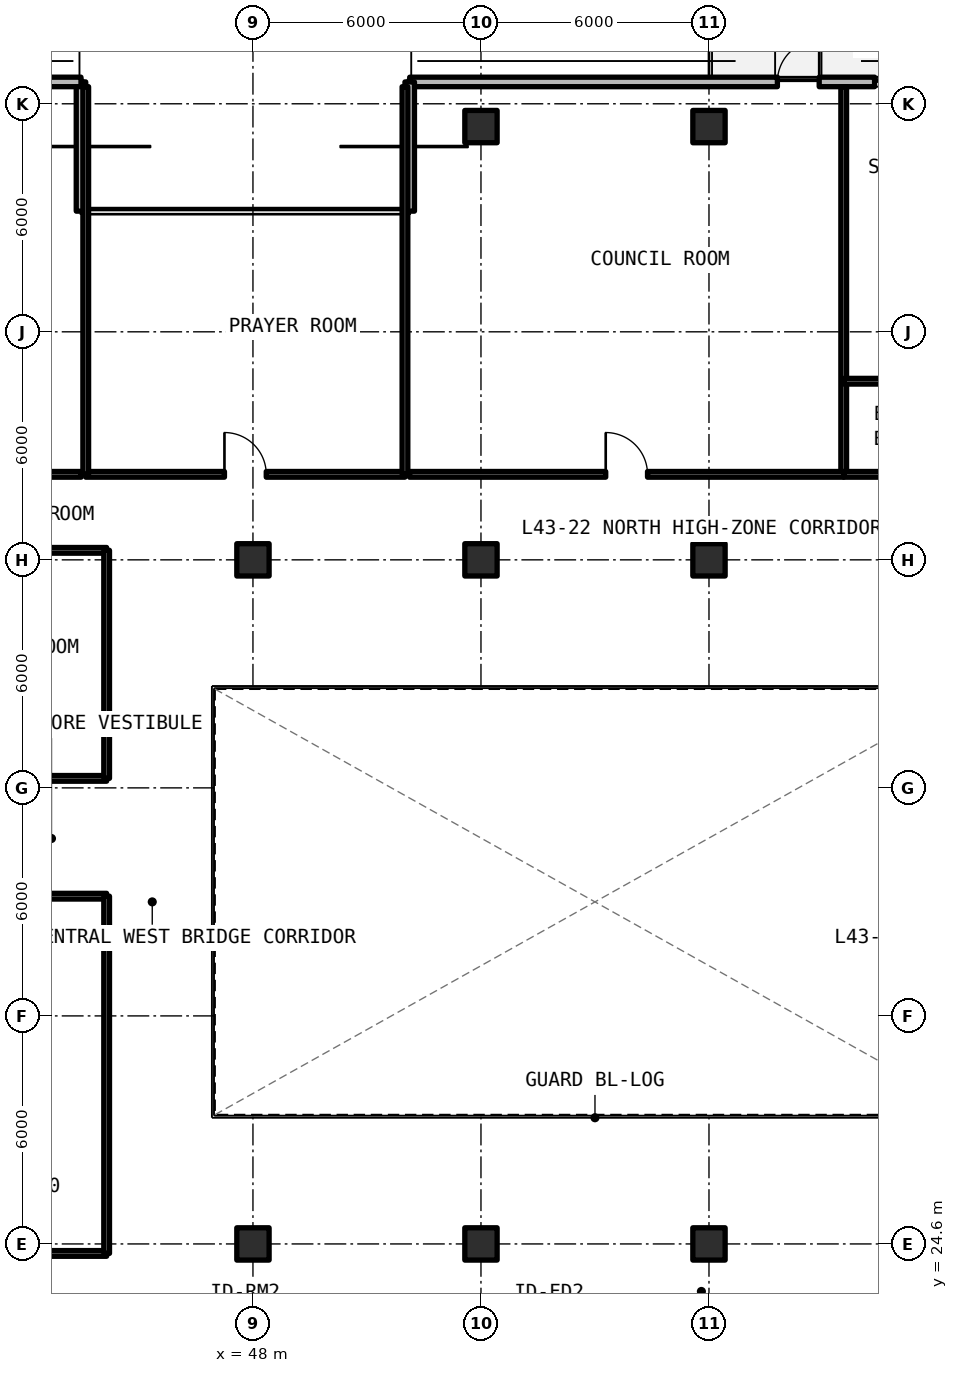
"""IFC4 building model, lengths in metres.
Left out: names, types, materials, properties, quantities, classifications, styles, units other than length and angle.
Written with IfcOpenShell. Run it as: python <this file> out.ifc"""

import sys

from ifc_helpers import new_model, si_unit, direction, frame, frame_2d, origin, origin_2d, place, context, subcontext, project, spatial, rectangle, extrude, element, fill, save


model = new_model("IFC4")
c1 = context("Model", 3, precision=1e-05, world=origin(), true_north=direction((0.0, 1.0)))
c2 = subcontext(c1, "Body", "Model", "MODEL_VIEW")
j1 = project(units=[si_unit("LENGTHUNIT", "METRE"), si_unit("PLANEANGLEUNIT", "RADIAN")], contexts=[c1])
p1 = place(None, origin())
s1 = spatial("IfcSite", under=j1, at=p1, CompositionType="ELEMENT")
p2 = place(p1, origin())
s2 = spatial("IfcBuilding", under=s1, at=p2, CompositionType="ELEMENT")
p3 = place(p2, frame((0.0, 0.0, 155.1)))
s3 = spatial("IfcBuildingStorey", under=s2, at=p3, CompositionType="ELEMENT", Elevation=155.1)
for number, where, z_axis, x_axis in (
    (1, (48.0, 24.6, 0.0), (0.0, 0.0, 1.0), (1.0, 0.0, 0.0)),
    (2, (48.0, 42.6, 0.0), (0.0, 0.0, 1.0), (1.0, 0.0, 0.0)),
    (3, (54.0, 24.6, 0.0), (0.0, 0.0, 1.0), (1.0, 0.0, 0.0)),
    (4, (54.0, 42.6, 0.0), (0.0, 0.0, 1.0), (1.0, 0.0, 0.0)),
    (5, (60.0, 24.6, 0.0), (0.0, 0.0, 1.0), (1.0, 0.0, 0.0)),
    (6, (60.0, 42.6, 0.0), (0.0, 0.0, 1.0), (1.0, 0.0, 0.0)),
    (7, (54.0, 54.0, 0.0), (0.0, 0.0, 1.0), (1.0, 0.0, 0.0)),
    (8, (60.0, 54.0, 0.0), (0.0, 0.0, 1.0), (1.0, 0.0, 0.0)),
):
    element("IfcColumn", number, at=place(p3, frame(where, z_axis=z_axis, x_axis=x_axis)), inside=s3, PredefinedType="COLUMN", context=c2, shape_type="SweptSolid", body=[
        extrude(rectangle(XDim=0.85, YDim=0.85, at=origin_2d()), origin(), (0.0, 0.0, 1.0), 3.3),
    ])
p4 = place(p3, frame((95.748, 55.175, 0.0), z_axis=(0.0, 0.0, 1.0), x_axis=(-1.0, 0.0, 0.0)))
e9 = element("IfcWall", 9, at=p4, inside=s3, PredefinedType="SOLIDWALL", context=c2, shape_type="SweptSolid", body=[
    extrude(rectangle(XDim=43.623, YDim=0.25, at=frame_2d((21.812, 0.0))), origin(), (0.0, 0.0, 1.0), 3.08),
])
p5 = place(p4, frame((32.848, 0.0, 0.0)))
e10 = element("IfcOpeningElement", 10, at=p5, cuts=e9, PredefinedType="OPENING", context=c2, shape_type="SweptSolid", body=[
    extrude(rectangle(XDim=1.1, YDim=2.15, at=frame_2d((0.55, 1.075))), frame((0.0, 0.135, 0.0), z_axis=(0.0, -1.0, 0.0), x_axis=(1.0, 0.0, 0.0)), (0.0, 0.0, 1.0), 0.27),
])
p6 = place(p4, frame((19.498, 0.0, 0.0)))
e11 = element("IfcOpeningElement", 11, at=p6, cuts=e9, PredefinedType="OPENING", context=c2, shape_type="SweptSolid", body=[
    extrude(rectangle(XDim=1.1, YDim=2.15, at=frame_2d((0.55, 1.075))), frame((0.0, 0.135, 0.0), z_axis=(0.0, -1.0, 0.0), x_axis=(1.0, 0.0, 0.0)), (0.0, 0.0, 1.0), 0.27),
])
p7 = place(p4, frame((30.541, 0.0, 0.78)))
e12 = element("IfcOpeningElement", 12, at=p7, cuts=e9, PredefinedType="OPENING", context=c2, shape_type="SweptSolid", body=[
    extrude(rectangle(XDim=0.85, YDim=1.65, at=frame_2d((0.425, 0.825))), frame((0.0, 0.135, 0.0), z_axis=(0.0, -1.0, 0.0), x_axis=(1.0, 0.0, 0.0)), (0.0, 0.0, 1.0), 0.27),
])
p8 = place(p4, frame((24.524, 0.0, 0.78)))
e13 = element("IfcOpeningElement", 13, at=p8, cuts=e9, PredefinedType="OPENING", context=c2, shape_type="SweptSolid", body=[
    extrude(rectangle(XDim=1.8, YDim=1.66, at=frame_2d((0.9, 0.83))), frame((0.0, 0.135, 0.0), z_axis=(0.0, -1.0, 0.0), x_axis=(1.0, 0.0, 0.0)), (0.0, 0.0, 1.0), 0.27),
])
p9 = place(p4, frame((9.092, 0.0, 0.78)))
e14 = element("IfcOpeningElement", 14, at=p9, cuts=e9, PredefinedType="OPENING", context=c2, shape_type="SweptSolid", body=[
    extrude(rectangle(XDim=1.8, YDim=1.66, at=frame_2d((0.9, 0.83))), frame((0.0, 0.135, 0.0), z_axis=(0.0, -1.0, 0.0), x_axis=(1.0, 0.0, 0.0)), (0.0, 0.0, 1.0), 0.27),
])
p10 = place(p4, frame((2.61, 0.0, 0.78)))
e15 = element("IfcOpeningElement", 15, at=p10, cuts=e9, PredefinedType="OPENING", context=c2, shape_type="SweptSolid", body=[
    extrude(rectangle(XDim=1.8, YDim=1.66, at=frame_2d((0.9, 0.83))), frame((0.0, 0.135, 0.0), z_axis=(0.0, -1.0, 0.0), x_axis=(1.0, 0.0, 0.0)), (0.0, 0.0, 1.0), 0.27),
])
for number, where, z_axis, x_axis in (
    (16, (52.125, 55.175, 0.0), (0.0, 0.0, 1.0), (0.0, -1.0, 0.0)),
    (17, (43.475, 51.775, 0.0), (0.0, 0.0, 1.0), (0.0, 1.0, 0.0)),
):
    element("IfcWall", number, at=place(p3, frame(where, z_axis=z_axis, x_axis=x_axis)), inside=s3, PredefinedType="SOLIDWALL", context=c2, shape_type="SweptSolid", body=[
        extrude(rectangle(XDim=3.4, YDim=0.25, at=frame_2d((1.7, 0.0))), origin(), (0.0, 0.0, 1.0), 3.08),
    ])
p11 = place(p3, frame((43.475, 55.175, 0.0), z_axis=(0.0, 0.0, 1.0), x_axis=(-1.0, 0.0, 0.0)))
e18 = element("IfcWall", 18, at=p11, inside=s3, PredefinedType="SOLIDWALL", context=c2, shape_type="SweptSolid", body=[
    extrude(rectangle(XDim=19.623, YDim=0.25, at=frame_2d((9.812, 0.0))), origin(), (0.0, 0.0, 1.0), 3.08),
])
p12 = place(p11, frame((15.625, 0.0, 0.0)))
e19 = element("IfcOpeningElement", 19, at=p12, cuts=e18, PredefinedType="OPENING", context=c2, shape_type="SweptSolid", body=[
    extrude(rectangle(XDim=1.1, YDim=2.15, at=frame_2d((0.55, 1.075))), frame((0.0, 0.135, 0.0), z_axis=(0.0, -1.0, 0.0), x_axis=(1.0, 0.0, 0.0)), (0.0, 0.0, 1.0), 0.27),
])
p13 = place(p11, frame((11.76, 0.0, 0.78)))
e20 = element("IfcOpeningElement", 20, at=p13, cuts=e18, PredefinedType="OPENING", context=c2, shape_type="SweptSolid", body=[
    extrude(rectangle(XDim=0.85, YDim=1.65, at=frame_2d((0.425, 0.825))), frame((0.0, 0.135, 0.0), z_axis=(0.0, -1.0, 0.0), x_axis=(1.0, 0.0, 0.0)), (0.0, 0.0, 1.0), 0.27),
])
p14 = place(p11, frame((9.829, 0.0, 0.78)))
e21 = element("IfcOpeningElement", 21, at=p14, cuts=e18, PredefinedType="OPENING", context=c2, shape_type="SweptSolid", body=[
    extrude(rectangle(XDim=0.85, YDim=1.65, at=frame_2d((0.425, 0.825))), frame((0.0, 0.135, 0.0), z_axis=(0.0, -1.0, 0.0), x_axis=(1.0, 0.0, 0.0)), (0.0, 0.0, 1.0), 0.27),
])
p15 = place(p11, frame((5.974, 0.0, 0.78)))
e22 = element("IfcOpeningElement", 22, at=p15, cuts=e18, PredefinedType="OPENING", context=c2, shape_type="SweptSolid", body=[
    extrude(rectangle(XDim=0.85, YDim=1.65, at=frame_2d((0.425, 0.825))), frame((0.0, 0.135, 0.0), z_axis=(0.0, -1.0, 0.0), x_axis=(1.0, 0.0, 0.0)), (0.0, 0.0, 1.0), 0.27),
])
p16 = place(p11, frame((3.943, 0.0, 0.78)))
e23 = element("IfcOpeningElement", 23, at=p16, cuts=e18, PredefinedType="OPENING", context=c2, shape_type="SweptSolid", body=[
    extrude(rectangle(XDim=0.85, YDim=1.65, at=frame_2d((0.425, 0.825))), frame((0.0, 0.135, 0.0), z_axis=(0.0, -1.0, 0.0), x_axis=(1.0, 0.0, 0.0)), (0.0, 0.0, 1.0), 0.27),
])
p17 = place(p11, frame((2.109, 0.0, 0.78)))
e24 = element("IfcOpeningElement", 24, at=p17, cuts=e18, PredefinedType="OPENING", context=c2, shape_type="SweptSolid", body=[
    extrude(rectangle(XDim=0.85, YDim=1.65, at=frame_2d((0.425, 0.825))), frame((0.0, 0.135, 0.0), z_axis=(0.0, -1.0, 0.0), x_axis=(1.0, 0.0, 0.0)), (0.0, 0.0, 1.0), 0.27),
])
p18 = place(p3, frame((36.27, 24.35, 0.0), z_axis=(0.0, 0.0, 1.0), x_axis=(1.0, 0.0, 0.0)))
e25 = element("IfcWall", 25, at=p18, inside=s3, PredefinedType="SOLIDWALL", context=c2, shape_type="SweptSolid", body=[
    extrude(rectangle(XDim=7.88, YDim=0.15, at=frame_2d((3.94, 0.0))), origin(), (0.0, 0.0, 1.0), 2.35),
])
p19 = place(p3, frame((36.27, 33.75, 0.0), z_axis=(0.0, 0.0, 1.0), x_axis=(1.0, 0.0, 0.0)))
e26 = element("IfcWall", 26, at=p19, inside=s3, PredefinedType="SOLIDWALL", context=c2, shape_type="SweptSolid", body=[
    extrude(rectangle(XDim=7.88, YDim=0.15, at=frame_2d((3.94, 0.0))), origin(), (0.0, 0.0, 1.0), 2.35),
])
p20 = place(p19, frame((3.465, 0.0, 0.0)))
e27 = element("IfcOpeningElement", 27, at=p20, cuts=e26, PredefinedType="OPENING", context=c2, shape_type="SweptSolid", body=[
    extrude(rectangle(XDim=0.95, YDim=2.15, at=frame_2d((0.475, 1.075))), frame((0.0, 0.085, 0.0), z_axis=(0.0, -1.0, 0.0), x_axis=(1.0, 0.0, 0.0)), (0.0, 0.0, 1.0), 0.17),
])
p21 = place(p3, frame((44.15, 24.35, 0.0), z_axis=(0.0, 0.0, 1.0), x_axis=(0.0, 1.0, 0.0)))
e28 = element("IfcWall", 28, at=p21, inside=s3, PredefinedType="SOLIDWALL", context=c2, shape_type="SweptSolid", body=[
    extrude(rectangle(XDim=9.4, YDim=0.15, at=frame_2d((4.7, 0.0))), origin(), (0.0, 0.0, 1.0), 2.35),
])
p22 = place(p3, frame((36.27, 36.85, 0.0), z_axis=(0.0, 0.0, 1.0), x_axis=(1.0, 0.0, 0.0)))
e29 = element("IfcWall", 29, at=p22, inside=s3, PredefinedType="SOLIDWALL", context=c2, shape_type="SweptSolid", body=[
    extrude(rectangle(XDim=7.88, YDim=0.15, at=frame_2d((3.94, 0.0))), origin(), (0.0, 0.0, 1.0), 2.35),
])
p23 = place(p22, frame((3.465, 0.0, 0.0)))
e30 = element("IfcOpeningElement", 30, at=p23, cuts=e29, PredefinedType="OPENING", context=c2, shape_type="SweptSolid", body=[
    extrude(rectangle(XDim=0.95, YDim=2.15, at=frame_2d((0.475, 1.075))), frame((0.0, 0.085, 0.0), z_axis=(0.0, -1.0, 0.0), x_axis=(1.0, 0.0, 0.0)), (0.0, 0.0, 1.0), 0.17),
])
p24 = place(p3, frame((36.27, 42.85, 0.0), z_axis=(0.0, 0.0, 1.0), x_axis=(1.0, 0.0, 0.0)))
e31 = element("IfcWall", 31, at=p24, inside=s3, PredefinedType="SOLIDWALL", context=c2, shape_type="SweptSolid", body=[
    extrude(rectangle(XDim=7.88, YDim=0.15, at=frame_2d((3.94, 0.0))), origin(), (0.0, 0.0, 1.0), 2.35),
])
p25 = place(p3, frame((44.15, 36.85, 0.0), z_axis=(0.0, 0.0, 1.0), x_axis=(0.0, 1.0, 0.0)))
e32 = element("IfcWall", 32, at=p25, inside=s3, PredefinedType="SOLIDWALL", context=c2, shape_type="SweptSolid", body=[
    extrude(rectangle(XDim=6.0, YDim=0.15, at=frame_2d((3.0, 0.0))), origin(), (0.0, 0.0, 1.0), 2.35),
])
p26 = place(p3, frame((43.6, 44.85, 0.0), z_axis=(0.0, 0.0, 1.0), x_axis=(1.0, 0.0, 0.0)))
e33 = element("IfcWall", 33, at=p26, inside=s3, PredefinedType="SOLIDWALL", context=c2, shape_type="SweptSolid", body=[
    extrude(rectangle(XDim=8.4, YDim=0.15, at=frame_2d((4.2, 0.0))), origin(), (0.0, 0.0, 1.0), 2.35),
])
p27 = place(p26, frame((3.65, 0.0, 0.0)))
e34 = element("IfcOpeningElement", 34, at=p27, cuts=e33, PredefinedType="OPENING", context=c2, shape_type="SweptSolid", body=[
    extrude(rectangle(XDim=1.1, YDim=2.15, at=frame_2d((0.55, 1.075))), frame((0.0, 0.085, 0.0), z_axis=(0.0, -1.0, 0.0), x_axis=(1.0, 0.0, 0.0)), (0.0, 0.0, 1.0), 0.17),
])
for number, where, z_axis, x_axis in (
    (35, (43.6, 44.85, 0.0), (0.0, 0.0, 1.0), (0.0, 1.0, 0.0)),
    (36, (52.0, 44.85, 0.0), (0.0, 0.0, 1.0), (0.0, 1.0, 0.0)),
):
    element("IfcWall", number, at=place(p3, frame(where, z_axis=z_axis, x_axis=x_axis)), inside=s3, PredefinedType="SOLIDWALL", context=c2, shape_type="SweptSolid", body=[
        extrude(rectangle(XDim=10.2, YDim=0.15, at=frame_2d((5.1, 0.0))), origin(), (0.0, 0.0, 1.0), 2.35),
    ])
p28 = place(p3, frame((38.172, 44.85, 0.0), z_axis=(0.0, 0.0, 1.0), x_axis=(1.0, 0.0, 0.0)))
e37 = element("IfcWall", 37, at=p28, inside=s3, PredefinedType="SOLIDWALL", context=c2, shape_type="SweptSolid", body=[
    extrude(rectangle(XDim=5.308, YDim=0.15, at=frame_2d((2.654, 0.0))), origin(), (0.0, 0.0, 1.0), 2.35),
])
p29 = place(p28, frame((3.144, 0.0, 0.0)))
e38 = element("IfcOpeningElement", 38, at=p29, cuts=e37, PredefinedType="OPENING", context=c2, shape_type="SweptSolid", body=[
    extrude(rectangle(XDim=0.95, YDim=2.15, at=frame_2d((0.475, 1.075))), frame((0.0, 0.085, 0.0), z_axis=(0.0, -1.0, 0.0), x_axis=(1.0, 0.0, 0.0)), (0.0, 0.0, 1.0), 0.17),
])
p30 = place(p3, frame((63.545, 44.85, 0.0), z_axis=(0.0, 0.0, 1.0), x_axis=(0.0, 1.0, 0.0)))
e39 = element("IfcWall", 39, at=p30, inside=s3, PredefinedType="SOLIDWALL", context=c2, shape_type="SweptSolid", body=[
    extrude(rectangle(XDim=10.2, YDim=0.15, at=frame_2d((5.1, 0.0))), origin(), (0.0, 0.0, 1.0), 2.35),
])
p31 = place(p3, frame((52.12, 44.85, 0.0), z_axis=(0.0, 0.0, 1.0), x_axis=(1.0, 0.0, 0.0)))
e40 = element("IfcWall", 40, at=p31, inside=s3, PredefinedType="SOLIDWALL", context=c2, shape_type="SweptSolid", body=[
    extrude(rectangle(XDim=11.425, YDim=0.15, at=frame_2d((5.713, 0.0))), origin(), (0.0, 0.0, 1.0), 2.35),
])
p32 = place(p31, frame((5.163, 0.0, 0.0)))
e41 = element("IfcOpeningElement", 41, at=p32, cuts=e40, PredefinedType="OPENING", context=c2, shape_type="SweptSolid", body=[
    extrude(rectangle(XDim=1.1, YDim=2.15, at=frame_2d((0.55, 1.075))), frame((0.0, 0.085, 0.0), z_axis=(0.0, -1.0, 0.0), x_axis=(1.0, 0.0, 0.0)), (0.0, 0.0, 1.0), 0.17),
])
p33 = place(p3, frame((63.545, 47.3, 0.0), z_axis=(0.0, 0.0, 1.0), x_axis=(1.0, 0.0, 0.0)))
e42 = element("IfcWall", 42, at=p33, inside=s3, PredefinedType="PARTITIONING", context=c2, shape_type="SweptSolid", body=[
    extrude(rectangle(XDim=4.375, YDim=0.15, at=frame_2d((2.187, 0.0))), origin(), (0.0, 0.0, 1.0), 2.35),
])
p34 = place(p3, frame((63.545, 44.85, 0.0), z_axis=(0.0, 0.0, 1.0), x_axis=(1.0, 0.0, 0.0)))
e43 = element("IfcWall", 43, at=p34, inside=s3, PredefinedType="SOLIDWALL", context=c2, shape_type="SweptSolid", body=[
    extrude(rectangle(XDim=9.204, YDim=0.15, at=frame_2d((4.602, 0.0))), origin(), (0.0, 0.0, 1.0), 2.35),
])
p35 = place(p34, frame((6.354, 0.0, 0.0)))
e44 = element("IfcOpeningElement", 44, at=p35, cuts=e43, PredefinedType="OPENING", context=c2, shape_type="SweptSolid", body=[
    extrude(rectangle(XDim=0.95, YDim=2.15, at=frame_2d((0.475, 1.075))), frame((0.0, 0.085, 0.0), z_axis=(0.0, -1.0, 0.0), x_axis=(1.0, 0.0, 0.0)), (0.0, 0.0, 1.0), 0.17),
])
p36 = place(p5, frame((1.1, 0.0, 0.0), z_axis=(0.0, 0.0, 1.0), x_axis=(-1.0, 0.0, 0.0)))
e45 = element("IfcDoor", 45, at=p36, inside=s3, OperationType="SINGLE_SWING_LEFT", PredefinedType="DOOR", context=c2, shape_type="SweptSolid", body=[
    extrude(rectangle(XDim=1.1, YDim=2.15, at=frame_2d((0.55, 1.075))), frame((0.0, 0.025, 0.0), z_axis=(0.0, -1.0, 0.0), x_axis=(1.0, 0.0, 0.0)), (0.0, 0.0, 1.0), 0.05),
])
fill(e10, e45)
p37 = place(p7, origin())
e46 = element("IfcWindow", 46, at=p37, inside=s3, PartitioningType="SINGLE_PANEL", PredefinedType="WINDOW", context=c2, shape_type="SweptSolid", body=[
    extrude(rectangle(XDim=0.85, YDim=1.65, at=frame_2d((0.425, 0.825))), frame((0.0, 0.03, 0.0), z_axis=(0.0, -1.0, 0.0), x_axis=(1.0, 0.0, 0.0)), (0.0, 0.0, 1.0), 0.06),
])
fill(e12, e46)
p38 = place(p27, origin())
e47 = element("IfcDoor", 47, at=p38, inside=s3, OperationType="SINGLE_SWING_LEFT", PredefinedType="DOOR", context=c2, shape_type="SweptSolid", body=[
    extrude(rectangle(XDim=1.1, YDim=2.15, at=frame_2d((0.55, 1.075))), frame((0.0, 0.025, 0.0), z_axis=(0.0, -1.0, 0.0), x_axis=(1.0, 0.0, 0.0)), (0.0, 0.0, 1.0), 0.05),
])
fill(e34, e47)
p39 = place(p32, origin())
e48 = element("IfcDoor", 48, at=p39, inside=s3, OperationType="SINGLE_SWING_LEFT", PredefinedType="DOOR", context=c2, shape_type="SweptSolid", body=[
    extrude(rectangle(XDim=1.1, YDim=2.15, at=frame_2d((0.55, 1.075))), frame((0.0, 0.025, 0.0), z_axis=(0.0, -1.0, 0.0), x_axis=(1.0, 0.0, 0.0)), (0.0, 0.0, 1.0), 0.05),
])
fill(e41, e48)
save(model, sys.argv[1])
